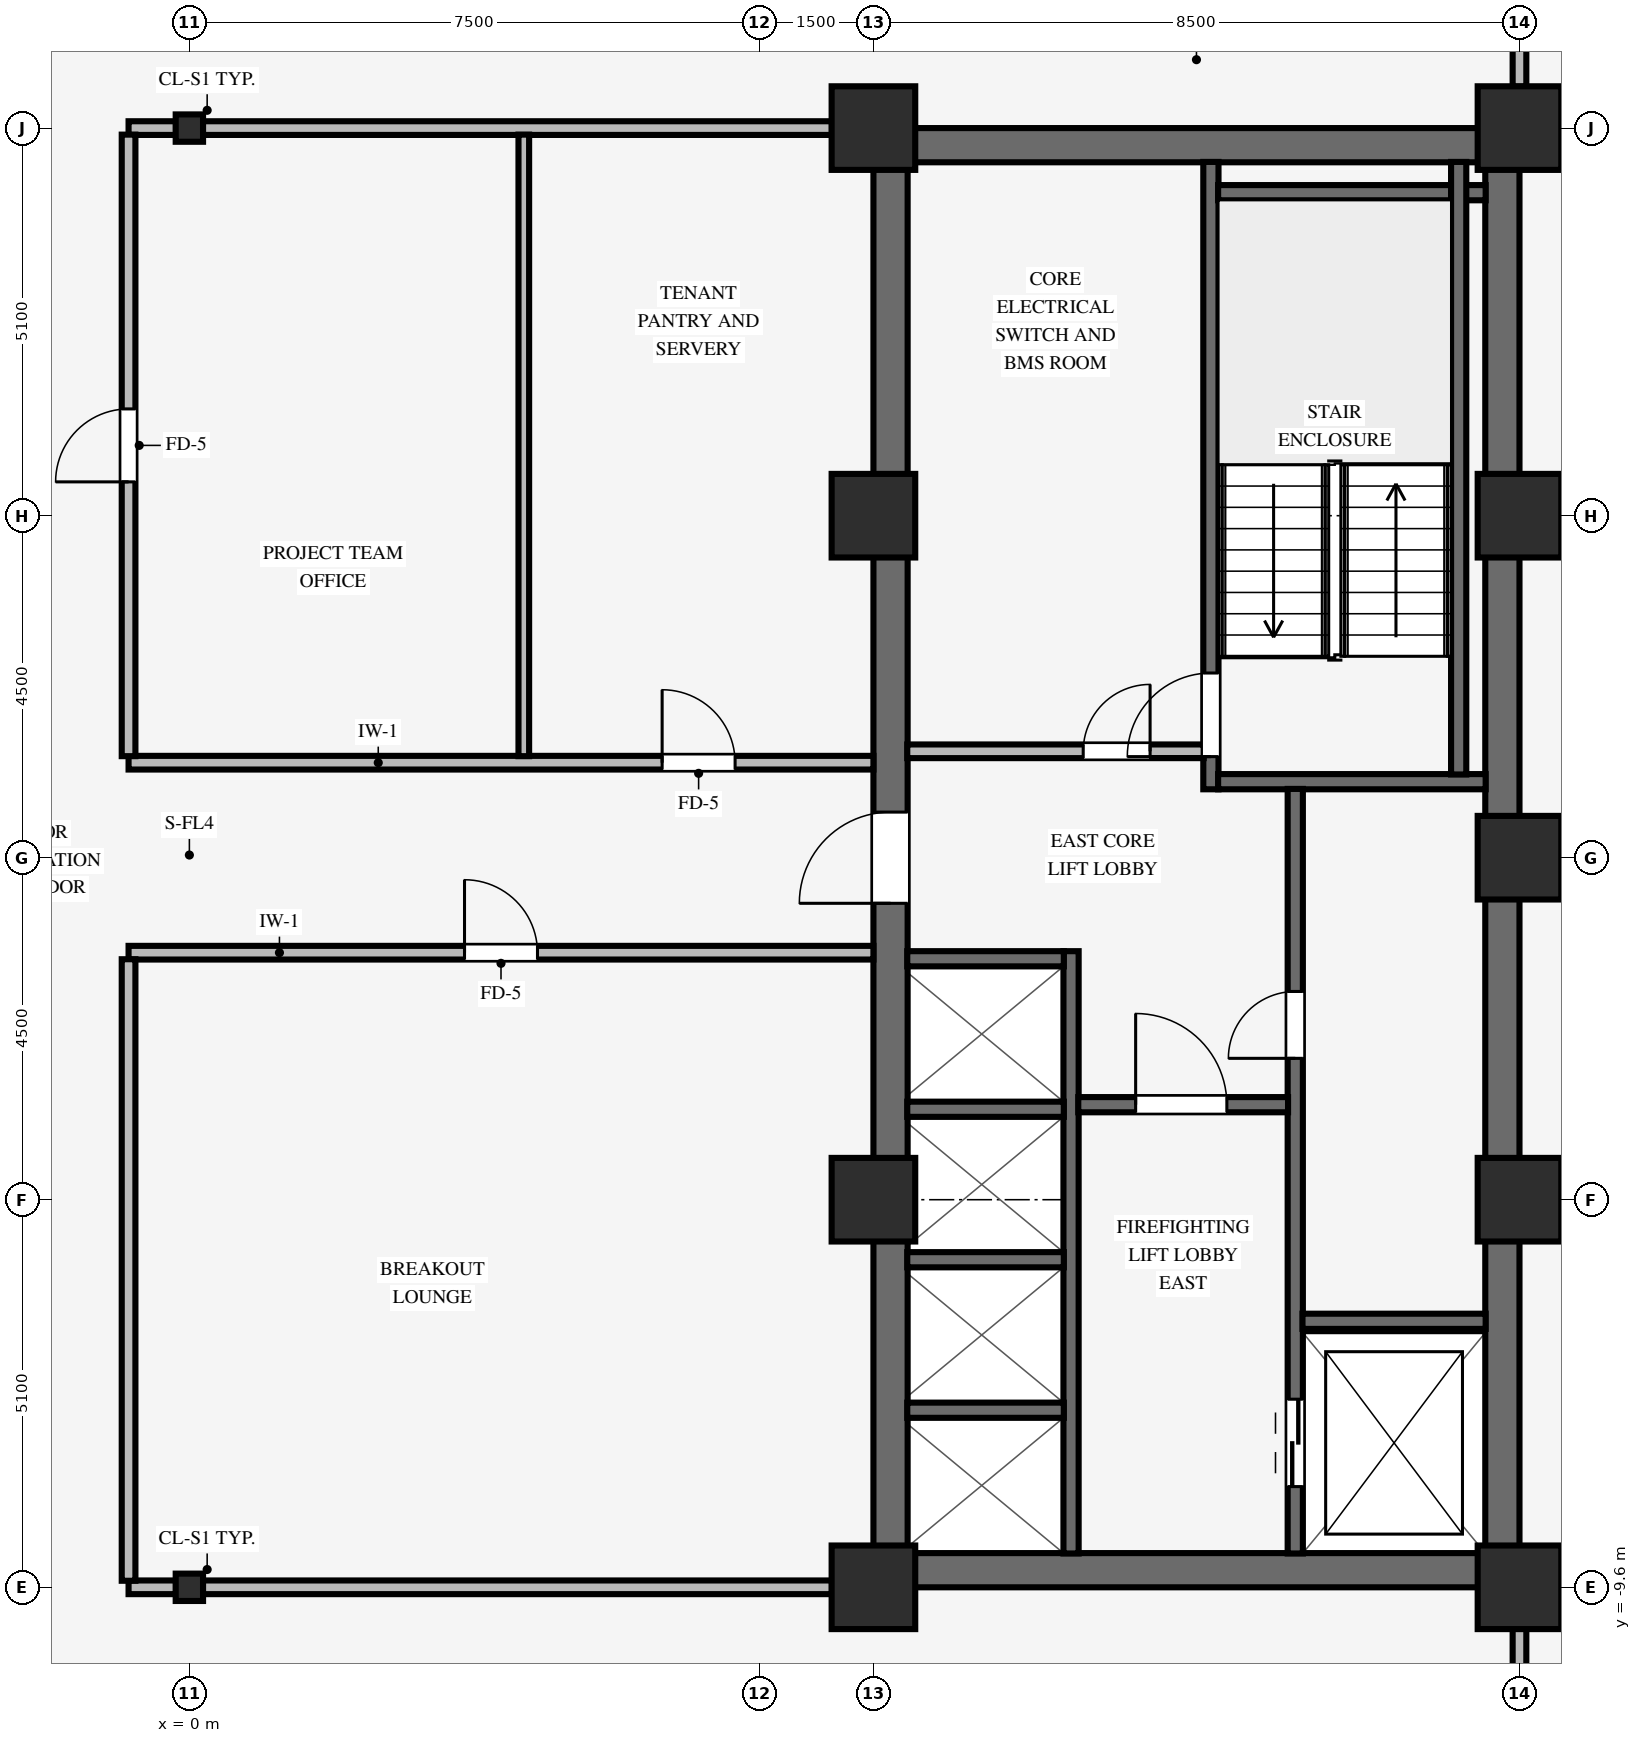
"""IFC4 building model, lengths in metres.
Left out: names, types, materials, properties, quantities, classifications, styles, units other than length and angle.
Written with IfcOpenShell. Run it as: python <this file> out.ifc"""

import sys

from ifc_helpers import new_model, si_unit, direction, frame, frame_2d, origin, origin_2d, place, context, subcontext, project, spatial, rectangle, i_section, extrude, source, transform, mapped, element, fill, save


model = new_model("IFC4")
c1 = context("Model", 3, precision=1e-05, world=origin(), true_north=direction((0.0, 1.0)))
c2 = subcontext(c1, "Body", "Model", "MODEL_VIEW")
j1 = project(units=[si_unit("LENGTHUNIT", "METRE"), si_unit("PLANEANGLEUNIT", "RADIAN")], contexts=[c1])
p1 = place(None, origin())
s1 = spatial("IfcSite", under=j1, at=p1, CompositionType="ELEMENT")
p2 = place(p1, origin())
s2 = spatial("IfcBuilding", under=s1, at=p2, CompositionType="ELEMENT")
p3 = place(p2, frame((0.0, 0.0, 71.4)))
s3 = spatial("IfcBuildingStorey", under=s2, at=p3, CompositionType="ELEMENT", Elevation=71.4)
for number, where, z_axis, x_axis in (
    (1, (9.0, -9.375, 0.0), (0.0, 0.0, 1.0), (1.0, 0.0, 0.0)),
    (2, (9.0, 9.375, 0.0), (0.0, 0.0, 1.0), (1.0, 0.0, 0.0)),
):
    element("IfcWall", number, at=place(p3, frame(where, z_axis=z_axis, x_axis=x_axis)), inside=s3, PredefinedType="SHEAR", context=c2, shape_type="SweptSolid", body=[
        extrude(rectangle(XDim=8.5, YDim=0.45, at=frame_2d((4.25, 0.0))), origin(), (0.0, 0.0, 1.0), 3.37),
    ])
p4 = place(p3, frame((9.225, -9.155, 0.0), z_axis=(0.0, 0.0, 1.0), x_axis=(0.0, 1.0, 0.0)))
e3 = element("IfcWall", 3, at=p4, inside=s3, PredefinedType="SHEAR", context=c2, shape_type="SweptSolid", body=[
    extrude(rectangle(XDim=18.31, YDim=0.45, at=frame_2d((9.155, 0.0))), origin(), (0.0, 0.0, 1.0), 3.37),
])
p5 = place(p4, frame((8.555, 0.0, 0.0)))
e4 = element("IfcOpeningElement", 4, at=p5, cuts=e3, PredefinedType="OPENING", context=c2, shape_type="SweptSolid", body=[
    extrude(rectangle(XDim=1.2, YDim=2.15, at=frame_2d((0.6, 1.075))), frame((0.0, 0.235, 0.0), z_axis=(0.0, -1.0, 0.0), x_axis=(1.0, 0.0, 0.0)), (0.0, 0.0, 1.0), 0.47),
])
p6 = place(p3, frame((17.275, -9.155, 0.0), z_axis=(0.0, 0.0, 1.0), x_axis=(0.0, 1.0, 0.0)))
e5 = element("IfcWall", 5, at=p6, inside=s3, PredefinedType="SHEAR", context=c2, shape_type="SweptSolid", body=[
    extrude(rectangle(XDim=18.31, YDim=0.45, at=frame_2d((9.155, 0.0))), origin(), (0.0, 0.0, 1.0), 3.37),
])
for number, where, z_axis, x_axis in (
    (6, (9.0, -9.6, 0.0), (0.0, 0.0, 1.0), (1.0, 0.0, 0.0)),
    (7, (9.0, -4.5, 0.0), (0.0, 0.0, 1.0), (1.0, 0.0, 0.0)),
    (8, (9.0, 4.5, 0.0), (0.0, 0.0, 1.0), (1.0, 0.0, 0.0)),
    (9, (9.0, 9.6, 0.0), (0.0, 0.0, 1.0), (1.0, 0.0, 0.0)),
    (10, (17.5, -9.6, 0.0), (0.0, 0.0, 1.0), (1.0, 0.0, 0.0)),
    (11, (17.5, -4.5, 0.0), (0.0, 0.0, 1.0), (1.0, 0.0, 0.0)),
    (12, (17.5, 4.5, 0.0), (0.0, 0.0, 1.0), (1.0, 0.0, 0.0)),
    (13, (17.5, 9.6, 0.0), (0.0, 0.0, 1.0), (1.0, 0.0, 0.0)),
    (14, (17.5, 0.0, 0.0), (0.0, 0.0, 1.0), (1.0, 0.0, 0.0)),
):
    element("IfcColumn", number, at=place(p3, frame(where, z_axis=z_axis, x_axis=x_axis)), inside=s3, PredefinedType="COLUMN", context=c2, shape_type="SweptSolid", body=[
        extrude(rectangle(XDim=1.1, YDim=1.1, at=origin_2d()), origin(), (0.0, 0.0, 1.0), 3.37),
    ])
for number, where, z_axis, x_axis in (
    (15, (0.0, -9.6, 0.0), (0.0, 0.0, 1.0), (1.0, 0.0, 0.0)),
    (16, (0.0, 9.6, 0.0), (0.0, 0.0, 1.0), (1.0, 0.0, 0.0)),
):
    element("IfcColumn", number, at=place(p3, frame(where, z_axis=z_axis, x_axis=x_axis)), inside=s3, PredefinedType="COLUMN", context=c2, shape_type="SweptSolid", body=[
        extrude(i_section(OverallWidth=0.36, OverallDepth=0.36, WebThickness=0.021, FlangeThickness=0.021, FilletRadius=0.018, at=origin_2d()), origin(), (0.0, 0.0, 1.0), 3.37),
    ])
p7 = place(p3, frame((13.44, 0.9, 0.0), z_axis=(0.0, 0.0, 1.0), x_axis=(0.0, 1.0, 0.0)))
e17 = element("IfcWall", 17, at=p7, inside=s3, PredefinedType="SHEAR", context=c2, shape_type="SweptSolid", body=[
    extrude(rectangle(XDim=8.255, YDim=0.2, at=frame_2d((4.127, 0.0))), origin(), (0.0, 0.0, 1.0), 3.37),
])
p8 = place(p7, frame((0.43, 0.0, 0.0)))
e18 = element("IfcOpeningElement", 18, at=p8, cuts=e17, PredefinedType="OPENING", context=c2, shape_type="SweptSolid", body=[
    extrude(rectangle(XDim=1.1, YDim=2.15, at=frame_2d((0.55, 1.075))), frame((0.0, 0.11, 0.0), z_axis=(0.0, -1.0, 0.0), x_axis=(1.0, 0.0, 0.0)), (0.0, 0.0, 1.0), 0.22),
])
for number, where, z_axis, x_axis in (
    (19, (13.535, 1.0, 0.0), (0.0, 0.0, 1.0), (1.0, 0.0, 0.0)),
    (20, (13.535, 8.75, 0.0), (0.0, 0.0, 1.0), (1.0, 0.0, 0.0)),
):
    element("IfcWall", number, at=place(p3, frame(where, z_axis=z_axis, x_axis=x_axis)), inside=s3, PredefinedType="SHEAR", context=c2, shape_type="SweptSolid", body=[
        extrude(rectangle(XDim=3.52, YDim=0.2, at=frame_2d((1.76, 0.0))), origin(), (0.0, 0.0, 1.0), 3.37),
    ])
p9 = place(p3, frame((16.7, 1.095, 0.0), z_axis=(0.0, 0.0, 1.0), x_axis=(0.0, 1.0, 0.0)))
e21 = element("IfcWall", 21, at=p9, inside=s3, PredefinedType="SHEAR", context=c2, shape_type="SweptSolid", body=[
    extrude(rectangle(XDim=8.06, YDim=0.2, at=frame_2d((4.03, 0.0))), origin(), (0.0, 0.0, 1.0), 3.37),
])
p10 = place(p3, frame((14.55, -9.155, 0.0), z_axis=(0.0, 0.0, 1.0), x_axis=(0.0, 1.0, 0.0)))
e22 = element("IfcWall", 22, at=p10, inside=s3, PredefinedType="SHEAR", context=c2, shape_type="SweptSolid", body=[
    extrude(rectangle(XDim=10.06, YDim=0.2, at=frame_2d((5.03, 0.0))), origin(), (0.0, 0.0, 1.0), 3.37),
])
p11 = place(p10, frame((6.515, 0.0, 0.0)))
e23 = element("IfcOpeningElement", 23, at=p11, cuts=e22, PredefinedType="OPENING", context=c2, shape_type="SweptSolid", body=[
    extrude(rectangle(XDim=0.88, YDim=2.1, at=frame_2d((0.44, 1.05))), frame((0.0, 0.11, 0.0), z_axis=(0.0, -1.0, 0.0), x_axis=(1.0, 0.0, 0.0)), (0.0, 0.0, 1.0), 0.22),
])
p12 = place(p10, frame((0.88, 0.0, 0.0)))
e24 = element("IfcOpeningElement", 24, at=p12, cuts=e22, PredefinedType="OPENING", context=c2, shape_type="SweptSolid", body=[
    extrude(rectangle(XDim=1.15, YDim=2.15, at=frame_2d((0.575, 1.075))), frame((0.0, 0.11, 0.0), z_axis=(0.0, -1.0, 0.0), x_axis=(1.0, 0.0, 0.0)), (0.0, 0.0, 1.0), 0.22),
])
p13 = place(p3, frame((14.645, -6.1, 0.0), z_axis=(0.0, 0.0, 1.0), x_axis=(1.0, 0.0, 0.0)))
e25 = element("IfcWall", 25, at=p13, inside=s3, PredefinedType="SHEAR", context=c2, shape_type="SweptSolid", body=[
    extrude(rectangle(XDim=2.41, YDim=0.2, at=frame_2d((1.205, 0.0))), origin(), (0.0, 0.0, 1.0), 3.37),
])
p14 = place(p3, frame((11.6, -9.155, 0.0), z_axis=(0.0, 0.0, 1.0), x_axis=(0.0, 1.0, 0.0)))
e26 = element("IfcWall", 26, at=p14, inside=s3, PredefinedType="SHEAR", context=c2, shape_type="SweptSolid", body=[
    extrude(rectangle(XDim=7.925, YDim=0.2, at=frame_2d((3.962, 0.0))), origin(), (0.0, 0.0, 1.0), 3.37),
])
p15 = place(p3, frame((11.695, -3.25, 0.0), z_axis=(0.0, 0.0, 1.0), x_axis=(1.0, 0.0, 0.0)))
e27 = element("IfcWall", 27, at=p15, inside=s3, PredefinedType="SHEAR", context=c2, shape_type="SweptSolid", body=[
    extrude(rectangle(XDim=2.76, YDim=0.2, at=frame_2d((1.38, 0.0))), origin(), (0.0, 0.0, 1.0), 3.37),
])
p16 = place(p15, frame((0.755, 0.0, 0.0)))
e28 = element("IfcOpeningElement", 28, at=p16, cuts=e27, PredefinedType="OPENING", context=c2, shape_type="SweptSolid", body=[
    extrude(rectangle(XDim=1.2, YDim=2.15, at=frame_2d((0.6, 1.075))), frame((0.0, 0.11, 0.0), z_axis=(0.0, -1.0, 0.0), x_axis=(1.0, 0.0, 0.0)), (0.0, 0.0, 1.0), 0.22),
])
for number, where, z_axis, x_axis in (
    (29, (9.445, -7.27, 0.0), (0.0, 0.0, 1.0), (1.0, 0.0, 0.0)),
    (30, (9.445, -5.29, 0.0), (0.0, 0.0, 1.0), (1.0, 0.0, 0.0)),
    (31, (9.445, -3.31, 0.0), (0.0, 0.0, 1.0), (1.0, 0.0, 0.0)),
    (32, (9.445, -1.33, 0.0), (0.0, 0.0, 1.0), (1.0, 0.0, 0.0)),
):
    element("IfcWall", number, at=place(p3, frame(where, z_axis=z_axis, x_axis=x_axis)), inside=s3, PredefinedType="SHEAR", context=c2, shape_type="SweptSolid", body=[
        extrude(rectangle(XDim=2.06, YDim=0.2, at=frame_2d((1.03, 0.0))), origin(), (0.0, 0.0, 1.0), 3.37),
    ])
p17 = place(p3, frame((9.445, 1.4, 0.0), z_axis=(0.0, 0.0, 1.0), x_axis=(1.0, 0.0, 0.0)))
e33 = element("IfcWall", 33, at=p17, inside=s3, PredefinedType="PARTITIONING", context=c2, shape_type="SweptSolid", body=[
    extrude(rectangle(XDim=3.9, YDim=0.18, at=frame_2d((1.95, 0.0))), origin(), (0.0, 0.0, 1.0), 3.36),
])
p18 = place(p17, frame((2.315, 0.0, 0.0)))
e34 = element("IfcOpeningElement", 34, at=p18, cuts=e33, PredefinedType="OPENING", context=c2, shape_type="SweptSolid", body=[
    extrude(rectangle(XDim=0.88, YDim=2.1, at=frame_2d((0.44, 1.05))), frame((0.0, 0.1, 0.0), z_axis=(0.0, -1.0, 0.0), x_axis=(1.0, 0.0, 0.0)), (0.0, 0.0, 1.0), 0.2),
])
p19 = place(p3, frame((-0.8, -9.6, 0.0), z_axis=(0.0, 0.0, 1.0), x_axis=(1.0, 0.0, 0.0)))
e35 = element("IfcWall", 35, at=p19, inside=s3, PredefinedType="PARTITIONING", context=c2, shape_type="SweptSolid", body=[
    extrude(rectangle(XDim=0.624, YDim=0.18, at=frame_2d((0.312, 0.0))), origin(), (0.0, 0.0, 1.0), 2.405),
])
p20 = place(p3, frame((0.176, -9.6, 0.0), z_axis=(0.0, 0.0, 1.0), x_axis=(1.0, 0.0, 0.0)))
e36 = element("IfcWall", 36, at=p20, inside=s3, PredefinedType="PARTITIONING", context=c2, shape_type="SweptSolid", body=[
    extrude(rectangle(XDim=8.278, YDim=0.18, at=frame_2d((4.139, 0.0))), origin(), (0.0, 0.0, 1.0), 2.405),
])
p21 = place(p3, frame((-0.8, -1.25, 0.0), z_axis=(0.0, 0.0, 1.0), x_axis=(1.0, 0.0, 0.0)))
e37 = element("IfcWall", 37, at=p21, inside=s3, PredefinedType="PARTITIONING", context=c2, shape_type="SweptSolid", body=[
    extrude(rectangle(XDim=9.8, YDim=0.18, at=frame_2d((4.9, 0.0))), origin(), (0.0, 0.0, 1.0), 3.36),
])
p22 = place(p21, frame((4.42, 0.0, 0.0)))
e38 = element("IfcOpeningElement", 38, at=p22, cuts=e37, PredefinedType="OPENING", context=c2, shape_type="SweptSolid", body=[
    extrude(rectangle(XDim=0.96, YDim=2.1, at=frame_2d((0.48, 1.05))), frame((0.0, 0.1, 0.0), z_axis=(0.0, -1.0, 0.0), x_axis=(1.0, 0.0, 0.0)), (0.0, 0.0, 1.0), 0.2),
])
p23 = place(p3, frame((-0.8, 1.25, 0.0), z_axis=(0.0, 0.0, 1.0), x_axis=(1.0, 0.0, 0.0)))
e39 = element("IfcWall", 39, at=p23, inside=s3, PredefinedType="PARTITIONING", context=c2, shape_type="SweptSolid", body=[
    extrude(rectangle(XDim=9.8, YDim=0.18, at=frame_2d((4.9, 0.0))), origin(), (0.0, 0.0, 1.0), 3.36),
])
p24 = place(p23, frame((7.02, 0.0, 0.0)))
e40 = element("IfcOpeningElement", 40, at=p24, cuts=e39, PredefinedType="OPENING", context=c2, shape_type="SweptSolid", body=[
    extrude(rectangle(XDim=0.96, YDim=2.1, at=frame_2d((0.48, 1.05))), frame((0.0, 0.1, 0.0), z_axis=(0.0, -1.0, 0.0), x_axis=(1.0, 0.0, 0.0)), (0.0, 0.0, 1.0), 0.2),
])
p25 = place(p3, frame((-0.8, 9.6, 0.0), z_axis=(0.0, 0.0, 1.0), x_axis=(1.0, 0.0, 0.0)))
e41 = element("IfcWall", 41, at=p25, inside=s3, PredefinedType="PARTITIONING", context=c2, shape_type="SweptSolid", body=[
    extrude(rectangle(XDim=0.624, YDim=0.18, at=frame_2d((0.312, 0.0))), origin(), (0.0, 0.0, 1.0), 2.405),
])
p26 = place(p3, frame((0.176, 9.6, 0.0), z_axis=(0.0, 0.0, 1.0), x_axis=(1.0, 0.0, 0.0)))
e42 = element("IfcWall", 42, at=p26, inside=s3, PredefinedType="PARTITIONING", context=c2, shape_type="SweptSolid", body=[
    extrude(rectangle(XDim=8.278, YDim=0.18, at=frame_2d((4.139, 0.0))), origin(), (0.0, 0.0, 1.0), 2.405),
])
p27 = place(p3, frame((-0.8, -9.514, 0.0), z_axis=(0.0, 0.0, 1.0), x_axis=(0.0, 1.0, 0.0)))
e43 = element("IfcWall", 43, at=p27, inside=s3, PredefinedType="PARTITIONING", context=c2, shape_type="SweptSolid", body=[
    extrude(rectangle(XDim=8.178, YDim=0.18, at=frame_2d((4.089, 0.0))), origin(), (0.0, 0.0, 1.0), 3.36),
])
p28 = place(p3, frame((-0.8, 1.336, 0.0), z_axis=(0.0, 0.0, 1.0), x_axis=(0.0, 1.0, 0.0)))
e44 = element("IfcWall", 44, at=p28, inside=s3, PredefinedType="PARTITIONING", context=c2, shape_type="SweptSolid", body=[
    extrude(rectangle(XDim=8.178, YDim=0.18, at=frame_2d((4.089, 0.0))), origin(), (0.0, 0.0, 1.0), 3.36),
])
p29 = place(p28, frame((3.609, 0.0, 0.0)))
e45 = element("IfcOpeningElement", 45, at=p29, cuts=e44, PredefinedType="OPENING", context=c2, shape_type="SweptSolid", body=[
    extrude(rectangle(XDim=0.96, YDim=2.1, at=frame_2d((0.48, 1.05))), frame((0.0, 0.1, 0.0), z_axis=(0.0, -1.0, 0.0), x_axis=(1.0, 0.0, 0.0)), (0.0, 0.0, 1.0), 0.2),
])
p30 = place(p3, frame((4.4, 1.336, 0.0), z_axis=(0.0, 0.0, 1.0), x_axis=(0.0, 1.0, 0.0)))
e46 = element("IfcWall", 46, at=p30, inside=s3, PredefinedType="PARTITIONING", context=c2, shape_type="SweptSolid", body=[
    extrude(rectangle(XDim=8.178, YDim=0.14, at=frame_2d((4.089, 0.0))), origin(), (0.0, 0.0, 1.0), 3.36),
])
for number, where, z_axis, x_axis in (
    (47, (17.5, -11.114, 0.0), (0.0, 0.0, 1.0), (0.0, 1.0, 0.0)),
    (48, (17.5, 10.146, 0.0), (0.0, 0.0, 1.0), (0.0, 1.0, 0.0)),
):
    element("IfcWall", number, at=place(p3, frame(where, z_axis=z_axis, x_axis=x_axis)), inside=s3, PredefinedType="PARTITIONING", context=c2, shape_type="SweptSolid", body=[
        extrude(rectangle(XDim=0.968, YDim=0.18, at=frame_2d((0.484, 0.0))), origin(), (0.0, 0.0, 1.0), 2.738),
    ])
m1 = source(origin(), c2, "Body", "SweptSolid", [
    extrude(rectangle(XDim=1.1, YDim=2.15, at=frame_2d((0.55, 1.075))), frame((0.0, 0.025, 0.0), z_axis=(0.0, -1.0, 0.0), x_axis=(1.0, 0.0, 0.0)), (0.0, 0.0, 1.0), 0.05),
])
p31 = place(p8, origin())
e49 = element("IfcDoor", 49, at=p31, inside=s3, OperationType="SINGLE_SWING_LEFT", PredefinedType="DOOR", context=c2, shape_type="MappedRepresentation", body=[
    mapped(m1, transform((0.0, 0.0, 0.0), scale=1.0)),
])
fill(e18, e49)
m2 = source(origin(), c2, "Body", "SweptSolid", [
    extrude(rectangle(XDim=0.88, YDim=2.1, at=frame_2d((0.44, 1.05))), frame((0.0, 0.025, 0.0), z_axis=(0.0, -1.0, 0.0), x_axis=(1.0, 0.0, 0.0)), (0.0, 0.0, 1.0), 0.05),
])
p32 = place(p11, origin())
e50 = element("IfcDoor", 50, at=p32, inside=s3, OperationType="SINGLE_SWING_LEFT", PredefinedType="DOOR", context=c2, shape_type="MappedRepresentation", body=[
    mapped(m2, transform((0.0, 0.0, 0.0), scale=1.0)),
])
fill(e23, e50)
m3 = source(origin(), c2, "Body", "SweptSolid", [
    extrude(rectangle(XDim=1.2, YDim=2.15, at=frame_2d((0.6, 1.075))), frame((0.0, 0.025, 0.0), z_axis=(0.0, -1.0, 0.0), x_axis=(1.0, 0.0, 0.0)), (0.0, 0.0, 1.0), 0.05),
])
p33 = place(p16, origin())
e51 = element("IfcDoor", 51, at=p33, inside=s3, OperationType="SINGLE_SWING_LEFT", PredefinedType="DOOR", context=c2, shape_type="MappedRepresentation", body=[
    mapped(m3, transform((0.0, 0.0, 0.0), scale=1.0)),
])
fill(e28, e51)
p34 = place(p5, origin())
e52 = element("IfcDoor", 52, at=p34, inside=s3, OperationType="SINGLE_SWING_LEFT", PredefinedType="DOOR", context=c2, shape_type="MappedRepresentation", body=[
    mapped(m3, transform((0.0, 0.0, 0.0), scale=1.0)),
])
fill(e4, e52)
p35 = place(p18, origin())
e53 = element("IfcDoor", 53, at=p35, inside=s3, OperationType="SINGLE_SWING_RIGHT", PredefinedType="DOOR", context=c2, shape_type="MappedRepresentation", body=[
    mapped(m2, transform((0.0, 0.0, 0.0), scale=1.0)),
])
fill(e34, e53)
m4 = source(origin(), c2, "Body", "SweptSolid", [
    extrude(rectangle(XDim=1.15, YDim=2.15, at=frame_2d((0.575, 1.075))), frame((0.0, 0.025, 0.0), z_axis=(0.0, -1.0, 0.0), x_axis=(1.0, 0.0, 0.0)), (0.0, 0.0, 1.0), 0.05),
])
p36 = place(p12, origin())
e54 = element("IfcDoor", 54, at=p36, inside=s3, OperationType="DOUBLE_DOOR_SLIDING", PredefinedType="DOOR", context=c2, shape_type="MappedRepresentation", body=[
    mapped(m4, transform((0.0, 0.0, 0.0), scale=1.0)),
])
fill(e24, e54)
m5 = source(origin(), c2, "Body", "SweptSolid", [
    extrude(rectangle(XDim=0.96, YDim=2.1, at=frame_2d((0.48, 1.05))), frame((0.0, 0.025, 0.0), z_axis=(0.0, -1.0, 0.0), x_axis=(1.0, 0.0, 0.0)), (0.0, 0.0, 1.0), 0.05),
])
p37 = place(p22, origin())
e55 = element("IfcDoor", 55, at=p37, inside=s3, OperationType="SINGLE_SWING_LEFT", PredefinedType="DOOR", context=c2, shape_type="MappedRepresentation", body=[
    mapped(m5, transform((0.0, 0.0, 0.0), scale=1.0)),
])
fill(e38, e55)
p38 = place(p29, origin())
e56 = element("IfcDoor", 56, at=p38, inside=s3, OperationType="SINGLE_SWING_LEFT", PredefinedType="DOOR", context=c2, shape_type="MappedRepresentation", body=[
    mapped(m5, transform((0.0, 0.0, 0.0), scale=1.0)),
])
fill(e45, e56)
p39 = place(p24, origin())
e57 = element("IfcDoor", 57, at=p39, inside=s3, OperationType="SINGLE_SWING_LEFT", PredefinedType="DOOR", context=c2, shape_type="MappedRepresentation", body=[
    mapped(m5, transform((0.0, 0.0, 0.0), scale=1.0)),
])
fill(e40, e57)
save(model, sys.argv[1])
